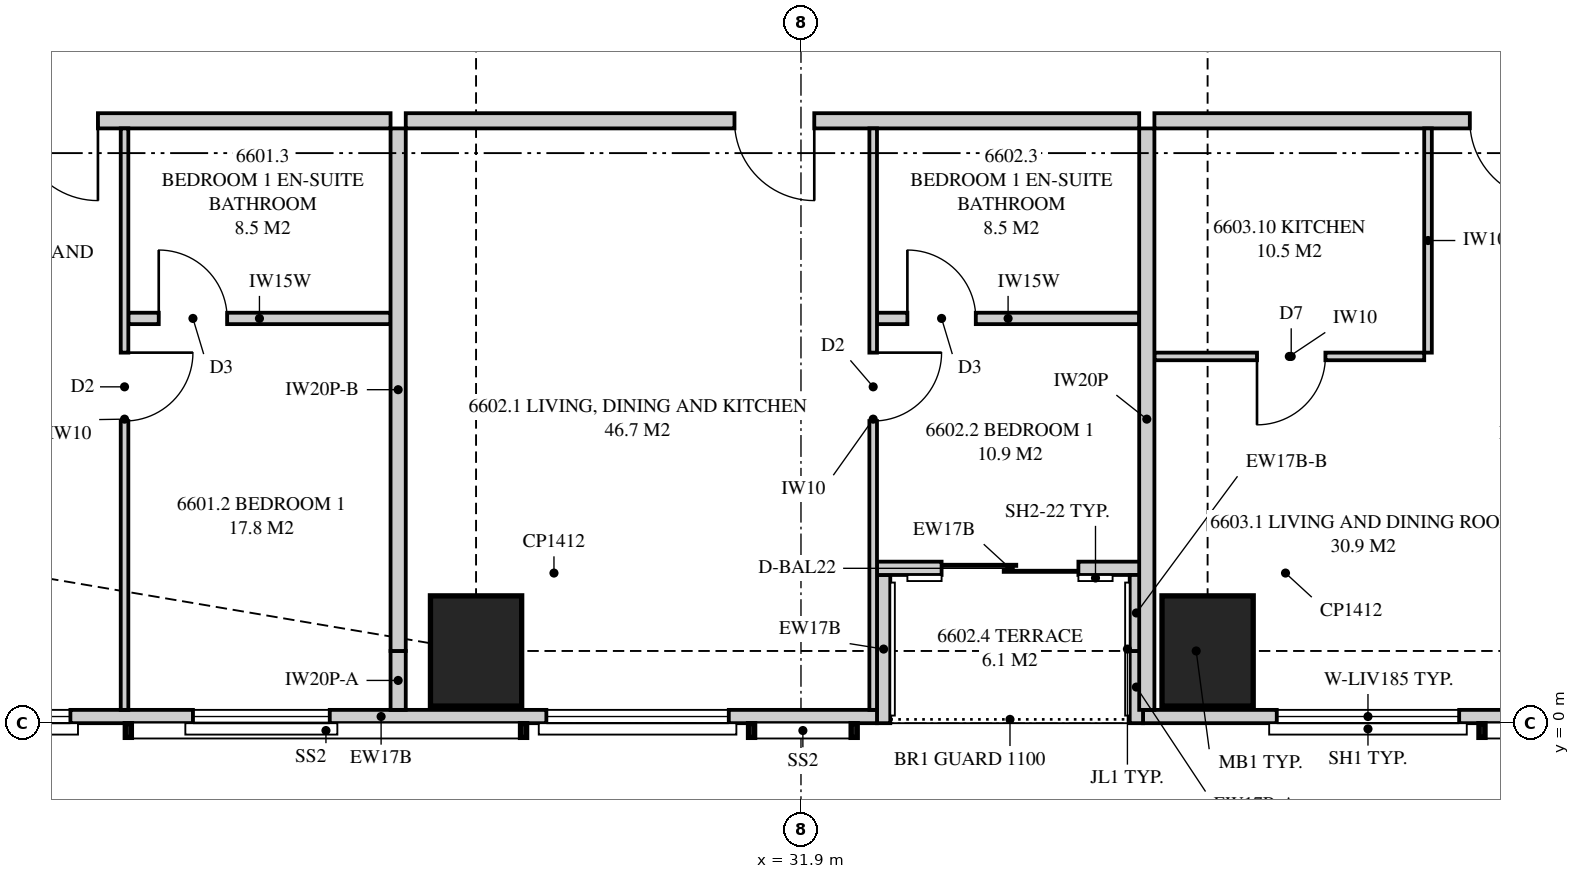
"""IFC4 building model, lengths in metres.
Left out: names, types, materials, properties, quantities, classifications, styles, units other than length and angle.
Written with IfcOpenShell. Run it as: python <this file> out.ifc"""

import sys

from ifc_helpers import new_model, si_unit, direction, frame, frame_2d, origin, origin_2d, place, context, subcontext, project, spatial, polyline, rectangle, outline, extrude, element, fill, save


model = new_model("IFC4")
c1 = context("Model", 3, precision=1e-05, world=origin(), true_north=direction((0.0, 1.0)))
c2 = subcontext(c1, "Body", "Model", "MODEL_VIEW")
j1 = project(units=[si_unit("LENGTHUNIT", "METRE"), si_unit("PLANEANGLEUNIT", "RADIAN")], contexts=[c1])
p1 = place(None, origin())
s1 = spatial("IfcSite", under=j1, at=p1, CompositionType="ELEMENT")
p2 = place(p1, origin())
s2 = spatial("IfcBuilding", under=s1, at=p2, CompositionType="ELEMENT")
p3 = place(p2, frame((0.0, 0.0, 242.45)))
s3 = spatial("IfcBuildingStorey", under=s2, at=p3, CompositionType="ELEMENT", Elevation=242.45)
for number, where, z_axis, x_axis in (
    (1, (27.625, 0.95, 0.0), (0.0, 0.0, 1.0), (0.0, 1.0, 0.0)),
    (2, (37.25, 0.95, 0.0), (0.0, 0.0, 1.0), (0.0, 1.0, 0.0)),
):
    element("IfcColumn", number, at=place(p3, frame(where, z_axis=z_axis, x_axis=x_axis)), inside=s3, PredefinedType="COLUMN", context=c2, shape_type="SweptSolid", body=[
        extrude(rectangle(XDim=1.45, YDim=1.2, at=origin_2d()), origin(), (0.0, 0.0, 1.0), 3.5),
    ])
p4 = place(p3, frame((19.851, 0.087, 0.0), z_axis=(0.0, 0.0, 1.0), x_axis=(1.0, 0.0, 0.0)))
e3 = element("IfcWall", 3, at=p4, inside=s3, PredefinedType="SOLIDWALL", context=c2, shape_type="SweptSolid", body=[
    extrude(outline(polyline([(0.0, 0.0), (13.049, 0.0), (13.049, 2.3), (7.774, 2.3), (7.774, 3.26), (7.642, 3.26), (7.642, 2.3), (7.559, 2.3), (7.559, 3.26), (0.0, 3.26), (0.0, 0.0)])), frame((0.0, 0.087, 0.0), z_axis=(0.0, -1.0, 0.0), x_axis=(1.0, 0.0, 0.0)), (0.0, 0.0, 1.0), 0.175),
])
p5 = place(p4, frame((0.636, 0.0, 0.4)))
e4 = element("IfcOpeningElement", 4, at=p5, cuts=e3, PredefinedType="OPENING", context=c2, shape_type="SweptSolid", body=[
    extrude(rectangle(XDim=1.8, YDim=1.85, at=frame_2d((0.9, 0.925))), frame((0.0, 0.097, 0.0), z_axis=(0.0, -1.0, 0.0), x_axis=(1.0, 0.0, 0.0)), (0.0, 0.0, 1.0), 0.195),
])
p6 = place(p4, frame((4.049, 0.0, 0.4)))
e5 = element("IfcOpeningElement", 5, at=p6, cuts=e3, PredefinedType="OPENING", context=c2, shape_type="SweptSolid", body=[
    extrude(rectangle(XDim=1.8, YDim=1.85, at=frame_2d((0.9, 0.925))), frame((0.0, 0.097, 0.0), z_axis=(0.0, -1.0, 0.0), x_axis=(1.0, 0.0, 0.0)), (0.0, 0.0, 1.0), 0.195),
])
p7 = place(p4, frame((8.699, 0.0, 0.4)))
e6 = element("IfcOpeningElement", 6, at=p7, cuts=e3, PredefinedType="OPENING", context=c2, shape_type="SweptSolid", body=[
    extrude(rectangle(XDim=2.4, YDim=1.85, at=frame_2d((1.2, 0.925))), frame((0.0, 0.097, 0.0), z_axis=(0.0, -1.0, 0.0), x_axis=(1.0, 0.0, 0.0)), (0.0, 0.0, 1.0), 0.195),
])
p8 = place(p3, frame((36.4, 0.087, 0.0), z_axis=(0.0, 0.0, 1.0), x_axis=(1.0, 0.0, 0.0)))
e7 = element("IfcWall", 7, at=p8, inside=s3, PredefinedType="SOLIDWALL", context=c2, shape_type="SweptSolid", body=[
    extrude(outline(polyline([(0.0, 0.0), (17.049, 0.0), (17.049, 3.26), (10.69, 3.26), (10.69, 2.3), (10.606, 2.3), (10.606, 3.26), (10.475, 3.26), (10.475, 2.3), (0.0, 2.3), (0.0, 0.0)])), frame((0.0, 0.087, 0.0), z_axis=(0.0, -1.0, 0.0), x_axis=(1.0, 0.0, 0.0)), (0.0, 0.0, 1.0), 0.175),
])
p9 = place(p8, frame((1.76, 0.0, 0.4)))
e8 = element("IfcOpeningElement", 8, at=p9, cuts=e7, PredefinedType="OPENING", context=c2, shape_type="SweptSolid", body=[
    extrude(rectangle(XDim=2.4, YDim=1.85, at=frame_2d((1.2, 0.925))), frame((0.0, 0.097, 0.0), z_axis=(0.0, -1.0, 0.0), x_axis=(1.0, 0.0, 0.0)), (0.0, 0.0, 1.0), 0.195),
])
p10 = place(p8, frame((6.6, 0.0, 0.4)))
e9 = element("IfcOpeningElement", 9, at=p10, cuts=e7, PredefinedType="OPENING", context=c2, shape_type="SweptSolid", body=[
    extrude(rectangle(XDim=1.8, YDim=1.85, at=frame_2d((0.9, 0.925))), frame((0.0, 0.097, 0.0), z_axis=(0.0, -1.0, 0.0), x_axis=(1.0, 0.0, 0.0)), (0.0, 0.0, 1.0), 0.195),
])
p11 = place(p8, frame((11.357, 0.0, 0.4)))
e10 = element("IfcOpeningElement", 10, at=p11, cuts=e7, PredefinedType="OPENING", context=c2, shape_type="SweptSolid", body=[
    extrude(rectangle(XDim=1.8, YDim=1.85, at=frame_2d((0.9, 0.925))), frame((0.0, 0.097, 0.0), z_axis=(0.0, -1.0, 0.0), x_axis=(1.0, 0.0, 0.0)), (0.0, 0.0, 1.0), 0.195),
])
p12 = place(p8, frame((14.2, 0.0, 0.4)))
e11 = element("IfcOpeningElement", 11, at=p12, cuts=e7, PredefinedType="OPENING", context=c2, shape_type="SweptSolid", body=[
    extrude(rectangle(XDim=1.8, YDim=1.85, at=frame_2d((0.9, 0.925))), frame((0.0, 0.097, 0.0), z_axis=(0.0, -1.0, 0.0), x_axis=(1.0, 0.0, 0.0)), (0.0, 0.0, 1.0), 0.195),
])
p13 = place(p3, frame((32.9, 2.038, 0.0), z_axis=(0.0, 0.0, 1.0), x_axis=(1.0, 0.0, 0.0)))
e12 = element("IfcWall", 12, at=p13, inside=s3, PredefinedType="SOLIDWALL", context=c2, shape_type="SweptSolid", body=[
    extrude(outline(polyline([(0.0, 0.0), (3.5, 0.0), (3.5, 2.66), (3.15, 2.66), (3.15, 3.26), (0.0, 3.26), (0.0, 0.0)])), frame((0.0, 0.087, 0.0), z_axis=(0.0, -1.0, 0.0), x_axis=(1.0, 0.0, 0.0)), (0.0, 0.0, 1.0), 0.175),
])
p14 = place(p13, frame((0.85, 0.0, 0.0)))
e13 = element("IfcOpeningElement", 13, at=p14, cuts=e12, PredefinedType="OPENING", context=c2, shape_type="SweptSolid", body=[
    extrude(rectangle(XDim=1.8, YDim=2.25, at=frame_2d((0.9, 1.125))), frame((0.0, 0.097, 0.0), z_axis=(0.0, -1.0, 0.0), x_axis=(1.0, 0.0, 0.0)), (0.0, 0.0, 1.0), 0.195),
])
p15 = place(p3, frame((32.988, 0.0, 0.0), z_axis=(0.0, 0.0, 1.0), x_axis=(0.0, 1.0, 0.0)))
e14 = element("IfcWall", 14, at=p15, inside=s3, PredefinedType="SOLIDWALL", context=c2, shape_type="SweptSolid", body=[
    extrude(outline(polyline([(0.0, 0.0), (1.95, 0.0), (1.95, 3.26), (1.75, 3.26), (1.75, 2.3), (0.15, 2.3), (0.15, 3.26), (0.0, 3.26), (0.0, 0.0)])), frame((0.0, 0.087, 0.0), z_axis=(0.0, -1.0, 0.0), x_axis=(1.0, 0.0, 0.0)), (0.0, 0.0, 1.0), 0.175),
])
p16 = place(p3, frame((36.312, 0.0, 0.0), z_axis=(0.0, 0.0, 1.0), x_axis=(0.0, 1.0, 0.0)))
e15 = element("IfcWall", 15, at=p16, inside=s3, PredefinedType="SOLIDWALL", context=c2, shape_type="SweptSolid", body=[
    extrude(outline(polyline([(0.0, 0.0), (0.95, 0.0), (0.95, 2.3), (0.15, 2.3), (0.15, 3.26), (0.0, 3.26), (0.0, 0.0)])), frame((0.0, 0.087, 0.0), z_axis=(0.0, -1.0, 0.0), x_axis=(1.0, 0.0, 0.0)), (0.0, 0.0, 1.0), 0.175),
])
p17 = place(p3, frame((36.312, 0.95, 0.0), z_axis=(0.0, 0.0, 1.0), x_axis=(0.0, 1.0, 0.0)))
e16 = element("IfcWall", 16, at=p17, inside=s3, PredefinedType="SOLIDWALL", context=c2, shape_type="SweptSolid", body=[
    extrude(outline(polyline([(0.0, 0.0), (1.0, 0.0), (1.0, 2.66), (0.8, 2.66), (0.8, 2.3), (0.0, 2.3), (0.0, 0.0)])), frame((0.0, 0.087, 0.0), z_axis=(0.0, -1.0, 0.0), x_axis=(1.0, 0.0, 0.0)), (0.0, 0.0, 1.0), 0.175),
])
p18 = place(p3, frame((26.6, 0.175, 0.0), z_axis=(0.0, 0.0, 1.0), x_axis=(0.0, 1.0, 0.0)))
e17 = element("IfcWall", 17, at=p18, inside=s3, PredefinedType="PARTITIONING", context=c2, shape_type="SweptSolid", body=[
    extrude(outline(polyline([(0.0, 0.0), (0.775, 0.0), (0.775, 2.3), (0.026, 2.3), (0.026, 3.26), (0.0, 3.26), (0.0, 0.0)])), frame((0.0, 0.1, 0.0), z_axis=(0.0, -1.0, 0.0), x_axis=(1.0, 0.0, 0.0)), (0.0, 0.0, 1.0), 0.2),
])
p19 = place(p3, frame((26.6, 0.95, 0.0), z_axis=(0.0, 0.0, 1.0), x_axis=(0.0, 1.0, 0.0)))
e18 = element("IfcWall", 18, at=p19, inside=s3, PredefinedType="PARTITIONING", context=c2, shape_type="SweptSolid", body=[
    extrude(outline(polyline([(0.0, 0.0), (6.875, 0.0), (6.875, 2.66), (1.097, 2.66), (1.097, 2.3), (0.0, 2.3), (0.0, 0.0)])), frame((0.0, 0.1, 0.0), z_axis=(0.0, -1.0, 0.0), x_axis=(1.0, 0.0, 0.0)), (0.0, 0.0, 1.0), 0.2),
])
p20 = place(p3, frame((18.0, 7.925, 0.0), z_axis=(0.0, 0.0, 1.0), x_axis=(1.0, 0.0, 0.0)))
e19 = element("IfcWall", 19, at=p20, inside=s3, PredefinedType="PARTITIONING", context=c2, shape_type="SweptSolid", body=[
    extrude(outline(polyline([(0.0, 0.0), (8.5, 0.0), (8.5, 3.26), (8.5, 2.66), (8.315, 2.66), (8.315, 3.26), (1.839, 3.26), (1.839, 2.3), (0.0, 2.3), (0.0, 3.26), (0.0, 0.0)])), frame((0.0, 0.1, 0.0), z_axis=(0.0, -1.0, 0.0), x_axis=(1.0, 0.0, 0.0)), (0.0, 0.0, 1.0), 0.2),
])
p21 = place(p20, frame((3.6, 0.0, 0.0)))
e20 = element("IfcOpeningElement", 20, at=p21, cuts=e19, PredefinedType="OPENING", context=c2, shape_type="SweptSolid", body=[
    extrude(rectangle(XDim=1.05, YDim=2.2, at=frame_2d((0.525, 1.1))), frame((0.0, 0.11, 0.0), z_axis=(0.0, -1.0, 0.0), x_axis=(1.0, 0.0, 0.0)), (0.0, 0.0, 1.0), 0.22),
])
p22 = place(p3, frame((23.0, 0.175, 0.0), z_axis=(0.0, 0.0, 1.0), x_axis=(0.0, 1.0, 0.0)))
e21 = element("IfcWall", 21, at=p22, inside=s3, PredefinedType="PARTITIONING", context=c2, shape_type="SweptSolid", body=[
    extrude(outline(polyline([(0.0, 0.0), (7.65, 0.0), (7.65, 3.26), (2.431, 3.26), (2.431, 2.3), (0.687, 2.3), (0.687, 3.26), (0.0, 3.26), (0.0, 0.0)])), frame((0.0, 0.05, 0.0), z_axis=(0.0, -1.0, 0.0), x_axis=(1.0, 0.0, 0.0)), (0.0, 0.0, 1.0), 0.1),
])
p23 = place(p22, frame((3.8, 0.0, 0.0)))
e22 = element("IfcOpeningElement", 22, at=p23, cuts=e21, PredefinedType="OPENING", context=c2, shape_type="SweptSolid", body=[
    extrude(rectangle(XDim=0.9, YDim=2.1, at=frame_2d((0.45, 1.05))), frame((0.0, 0.06, 0.0), z_axis=(0.0, -1.0, 0.0), x_axis=(1.0, 0.0, 0.0)), (0.0, 0.0, 1.0), 0.12),
])
p24 = place(p3, frame((23.05, 5.325, 0.0), z_axis=(0.0, 0.0, 1.0), x_axis=(1.0, 0.0, 0.0)))
e23 = element("IfcWall", 23, at=p24, inside=s3, PredefinedType="PLUMBINGWALL", context=c2, shape_type="SweptSolid", body=[
    extrude(outline(polyline([(0.0, 0.0), (3.45, 0.0), (3.45, 3.26), (3.45, 2.66), (3.29, 2.66), (3.29, 3.26), (0.0, 3.26), (0.0, 0.0)])), frame((0.0, 0.075, 0.0), z_axis=(0.0, -1.0, 0.0), x_axis=(1.0, 0.0, 0.0)), (0.0, 0.0, 1.0), 0.15),
])
p25 = place(p24, frame((0.4, 0.0, 0.0)))
e24 = element("IfcOpeningElement", 24, at=p25, cuts=e23, PredefinedType="OPENING", context=c2, shape_type="SweptSolid", body=[
    extrude(rectangle(XDim=0.9, YDim=2.1, at=frame_2d((0.45, 1.05))), frame((0.0, 0.085, 0.0), z_axis=(0.0, -1.0, 0.0), x_axis=(1.0, 0.0, 0.0)), (0.0, 0.0, 1.0), 0.17),
])
p26 = place(p3, frame((36.45, 0.175, 0.0), z_axis=(0.0, 0.0, 1.0), x_axis=(0.0, 1.0, 0.0)))
e25 = element("IfcWall", 25, at=p26, inside=s3, PredefinedType="PARTITIONING", context=c2, shape_type="SweptSolid", body=[
    extrude(outline(polyline([(0.0, 0.0), (7.65, 0.0), (7.65, 3.26), (7.65, 2.66), (1.685, 2.66), (1.685, 2.3), (0.0, 2.3), (0.0, 3.26), (0.0, 0.0)])), frame((0.0, 0.1, 0.0), z_axis=(0.0, -1.0, 0.0), x_axis=(1.0, 0.0, 0.0)), (0.0, 0.0, 1.0), 0.2),
])
p27 = place(p3, frame((26.7, 7.925, 0.0), z_axis=(0.0, 0.0, 1.0), x_axis=(1.0, 0.0, 0.0)))
e26 = element("IfcWall", 26, at=p27, inside=s3, PredefinedType="PARTITIONING", context=c2, shape_type="SweptSolid", body=[
    extrude(outline(polyline([(0.0, 0.0), (9.65, 0.0), (9.65, 3.26), (9.65, 2.66), (9.24, 2.66), (9.24, 3.26), (2.235, 3.26), (2.235, 2.66), (0.0, 2.66), (0.0, 3.26), (0.0, 0.0)])), frame((0.0, 0.1, 0.0), z_axis=(0.0, -1.0, 0.0), x_axis=(1.0, 0.0, 0.0)), (0.0, 0.0, 1.0), 0.2),
])
p28 = place(p27, frame((4.325, 0.0, 0.0)))
e27 = element("IfcOpeningElement", 27, at=p28, cuts=e26, PredefinedType="OPENING", context=c2, shape_type="SweptSolid", body=[
    extrude(rectangle(XDim=1.05, YDim=2.2, at=frame_2d((0.525, 1.1))), frame((0.0, 0.11, 0.0), z_axis=(0.0, -1.0, 0.0), x_axis=(1.0, 0.0, 0.0)), (0.0, 0.0, 1.0), 0.22),
])
p29 = place(p3, frame((32.85, 0.175, 0.0), z_axis=(0.0, 0.0, 1.0), x_axis=(0.0, 1.0, 0.0)))
e28 = element("IfcWall", 28, at=p29, inside=s3, PredefinedType="PARTITIONING", context=c2, shape_type="SweptSolid", body=[
    extrude(outline(polyline([(0.0, 0.0), (7.65, 0.0), (7.65, 3.26), (1.635, 3.26), (1.635, 2.3), (0.0, 2.3), (0.0, 3.26), (0.0, 0.0)])), frame((0.0, 0.05, 0.0), z_axis=(0.0, -1.0, 0.0), x_axis=(1.0, 0.0, 0.0)), (0.0, 0.0, 1.0), 0.1),
])
p30 = place(p29, frame((3.8, 0.0, 0.0)))
e29 = element("IfcOpeningElement", 29, at=p30, cuts=e28, PredefinedType="OPENING", context=c2, shape_type="SweptSolid", body=[
    extrude(rectangle(XDim=0.9, YDim=2.1, at=frame_2d((0.45, 1.05))), frame((0.0, 0.06, 0.0), z_axis=(0.0, -1.0, 0.0), x_axis=(1.0, 0.0, 0.0)), (0.0, 0.0, 1.0), 0.12),
])
p31 = place(p3, frame((32.9, 5.325, 0.0), z_axis=(0.0, 0.0, 1.0), x_axis=(1.0, 0.0, 0.0)))
e30 = element("IfcWall", 30, at=p31, inside=s3, PredefinedType="PLUMBINGWALL", context=c2, shape_type="SweptSolid", body=[
    extrude(outline(polyline([(0.0, 0.0), (3.45, 0.0), (3.45, 3.26), (3.45, 2.66), (3.065, 2.66), (3.065, 3.26), (0.0, 3.26), (0.0, 0.0)])), frame((0.0, 0.075, 0.0), z_axis=(0.0, -1.0, 0.0), x_axis=(1.0, 0.0, 0.0)), (0.0, 0.0, 1.0), 0.15),
])
p32 = place(p31, frame((0.4, 0.0, 0.0)))
e31 = element("IfcOpeningElement", 31, at=p32, cuts=e30, PredefinedType="OPENING", context=c2, shape_type="SweptSolid", body=[
    extrude(rectangle(XDim=0.9, YDim=2.1, at=frame_2d((0.45, 1.05))), frame((0.0, 0.085, 0.0), z_axis=(0.0, -1.0, 0.0), x_axis=(1.0, 0.0, 0.0)), (0.0, 0.0, 1.0), 0.17),
])
p33 = place(p3, frame((36.55, 7.925, 0.0), z_axis=(0.0, 0.0, 1.0), x_axis=(1.0, 0.0, 0.0)))
e32 = element("IfcWall", 32, at=p33, inside=s3, PredefinedType="PARTITIONING", context=c2, shape_type="SweptSolid", body=[
    extrude(outline(polyline([(0.0, 0.0), (9.325, 0.0), (9.325, 3.26), (9.325, 2.66), (9.015, 2.66), (9.015, 3.26), (2.01, 3.26), (2.01, 2.66), (0.0, 2.66), (0.0, 3.26), (0.0, 0.0)])), frame((0.0, 0.1, 0.0), z_axis=(0.0, -1.0, 0.0), x_axis=(1.0, 0.0, 0.0)), (0.0, 0.0, 1.0), 0.2),
])
p34 = place(p33, frame((4.15, 0.0, 0.0)))
e33 = element("IfcOpeningElement", 33, at=p34, cuts=e32, PredefinedType="OPENING", context=c2, shape_type="SweptSolid", body=[
    extrude(rectangle(XDim=1.05, YDim=2.2, at=frame_2d((0.525, 1.1))), frame((0.0, 0.11, 0.0), z_axis=(0.0, -1.0, 0.0), x_axis=(1.0, 0.0, 0.0)), (0.0, 0.0, 1.0), 0.22),
])
p35 = place(p3, frame((36.55, 4.825, 0.0), z_axis=(0.0, 0.0, 1.0), x_axis=(1.0, 0.0, 0.0)))
e34 = element("IfcWall", 34, at=p35, inside=s3, PredefinedType="PARTITIONING", context=c2, shape_type="SweptSolid", body=[
    extrude(outline(polyline([(0.0, 0.0), (3.55, 0.0), (3.55, 3.26), (1.96, 3.26), (1.96, 2.66), (0.0, 2.66), (0.0, 3.26), (0.0, 0.0)])), frame((0.0, 0.05, 0.0), z_axis=(0.0, -1.0, 0.0), x_axis=(1.0, 0.0, 0.0)), (0.0, 0.0, 1.0), 0.1),
])
p36 = place(p35, frame((1.35, 0.0, 0.0)))
e35 = element("IfcOpeningElement", 35, at=p36, cuts=e34, PredefinedType="OPENING", context=c2, shape_type="SweptSolid", body=[
    extrude(rectangle(XDim=0.9, YDim=2.1, at=frame_2d((0.45, 1.05))), frame((0.0, 0.06, 0.0), z_axis=(0.0, -1.0, 0.0), x_axis=(1.0, 0.0, 0.0)), (0.0, 0.0, 1.0), 0.12),
])
p37 = place(p3, frame((40.15, 4.875, 0.0), z_axis=(0.0, 0.0, 1.0), x_axis=(0.0, 1.0, 0.0)))
e36 = element("IfcWall", 36, at=p37, inside=s3, PredefinedType="PARTITIONING", context=c2, shape_type="SweptSolid", body=[
    extrude(rectangle(XDim=2.95, YDim=0.1, at=frame_2d((1.475, 0.0))), origin(), (0.0, 0.0, 1.0), 3.26),
])
p38 = place(p5, origin())
e37 = element("IfcWindow", 37, at=p38, inside=s3, PartitioningType="SINGLE_PANEL", PredefinedType="WINDOW", context=c2, shape_type="SweptSolid", body=[
    extrude(rectangle(XDim=1.8, YDim=1.85, at=frame_2d((0.9, 0.925))), frame((0.0, 0.03, 0.0), z_axis=(0.0, -1.0, 0.0), x_axis=(1.0, 0.0, 0.0)), (0.0, 0.0, 1.0), 0.06),
])
fill(e4, e37)
p39 = place(p6, origin())
e38 = element("IfcWindow", 38, at=p39, inside=s3, PartitioningType="SINGLE_PANEL", PredefinedType="WINDOW", context=c2, shape_type="SweptSolid", body=[
    extrude(rectangle(XDim=1.8, YDim=1.85, at=frame_2d((0.9, 0.925))), frame((0.0, 0.03, 0.0), z_axis=(0.0, -1.0, 0.0), x_axis=(1.0, 0.0, 0.0)), (0.0, 0.0, 1.0), 0.06),
])
fill(e5, e38)
p40 = place(p7, origin())
e39 = element("IfcWindow", 39, at=p40, inside=s3, PartitioningType="SINGLE_PANEL", PredefinedType="WINDOW", context=c2, shape_type="SweptSolid", body=[
    extrude(rectangle(XDim=2.4, YDim=1.85, at=frame_2d((1.2, 0.925))), frame((0.0, 0.03, 0.0), z_axis=(0.0, -1.0, 0.0), x_axis=(1.0, 0.0, 0.0)), (0.0, 0.0, 1.0), 0.06),
])
fill(e6, e39)
p41 = place(p14, origin())
e40 = element("IfcDoor", 40, at=p41, inside=s3, OperationType="SLIDING_TO_LEFT", PredefinedType="DOOR", context=c2, shape_type="SweptSolid", body=[
    extrude(rectangle(XDim=1.8, YDim=2.25, at=frame_2d((0.9, 1.125))), frame((0.0, 0.025, 0.0), z_axis=(0.0, -1.0, 0.0), x_axis=(1.0, 0.0, 0.0)), (0.0, 0.0, 1.0), 0.05),
])
fill(e13, e40)
p42 = place(p9, origin())
e41 = element("IfcWindow", 41, at=p42, inside=s3, PartitioningType="SINGLE_PANEL", PredefinedType="WINDOW", context=c2, shape_type="SweptSolid", body=[
    extrude(rectangle(XDim=2.4, YDim=1.85, at=frame_2d((1.2, 0.925))), frame((0.0, 0.03, 0.0), z_axis=(0.0, -1.0, 0.0), x_axis=(1.0, 0.0, 0.0)), (0.0, 0.0, 1.0), 0.06),
])
fill(e8, e41)
p43 = place(p21, frame((1.05, 0.0, 0.0), z_axis=(0.0, 0.0, 1.0), x_axis=(-1.0, 0.0, 0.0)))
e42 = element("IfcDoor", 42, at=p43, inside=s3, OperationType="SINGLE_SWING_LEFT", PredefinedType="DOOR", context=c2, shape_type="SweptSolid", body=[
    extrude(rectangle(XDim=1.05, YDim=2.2, at=frame_2d((0.525, 1.1))), frame((0.0, 0.025, 0.0), z_axis=(0.0, -1.0, 0.0), x_axis=(1.0, 0.0, 0.0)), (0.0, 0.0, 1.0), 0.05),
])
fill(e20, e42)
p44 = place(p23, frame((0.9, 0.0, 0.0), z_axis=(0.0, 0.0, 1.0), x_axis=(-1.0, 0.0, 0.0)))
e43 = element("IfcDoor", 43, at=p44, inside=s3, OperationType="SINGLE_SWING_LEFT", PredefinedType="DOOR", context=c2, shape_type="SweptSolid", body=[
    extrude(rectangle(XDim=0.9, YDim=2.1, at=frame_2d((0.45, 1.05))), frame((0.0, 0.025, 0.0), z_axis=(0.0, -1.0, 0.0), x_axis=(1.0, 0.0, 0.0)), (0.0, 0.0, 1.0), 0.05),
])
fill(e22, e43)
p45 = place(p25, origin())
e44 = element("IfcDoor", 44, at=p45, inside=s3, OperationType="SINGLE_SWING_LEFT", PredefinedType="DOOR", context=c2, shape_type="SweptSolid", body=[
    extrude(rectangle(XDim=0.9, YDim=2.1, at=frame_2d((0.45, 1.05))), frame((0.0, 0.025, 0.0), z_axis=(0.0, -1.0, 0.0), x_axis=(1.0, 0.0, 0.0)), (0.0, 0.0, 1.0), 0.05),
])
fill(e24, e44)
p46 = place(p28, frame((1.05, 0.0, 0.0), z_axis=(0.0, 0.0, 1.0), x_axis=(-1.0, 0.0, 0.0)))
e45 = element("IfcDoor", 45, at=p46, inside=s3, OperationType="SINGLE_SWING_LEFT", PredefinedType="DOOR", context=c2, shape_type="SweptSolid", body=[
    extrude(rectangle(XDim=1.05, YDim=2.2, at=frame_2d((0.525, 1.1))), frame((0.0, 0.025, 0.0), z_axis=(0.0, -1.0, 0.0), x_axis=(1.0, 0.0, 0.0)), (0.0, 0.0, 1.0), 0.05),
])
fill(e27, e45)
p47 = place(p30, frame((0.9, 0.0, 0.0), z_axis=(0.0, 0.0, 1.0), x_axis=(-1.0, 0.0, 0.0)))
e46 = element("IfcDoor", 46, at=p47, inside=s3, OperationType="SINGLE_SWING_LEFT", PredefinedType="DOOR", context=c2, shape_type="SweptSolid", body=[
    extrude(rectangle(XDim=0.9, YDim=2.1, at=frame_2d((0.45, 1.05))), frame((0.0, 0.025, 0.0), z_axis=(0.0, -1.0, 0.0), x_axis=(1.0, 0.0, 0.0)), (0.0, 0.0, 1.0), 0.05),
])
fill(e29, e46)
p48 = place(p32, origin())
e47 = element("IfcDoor", 47, at=p48, inside=s3, OperationType="SINGLE_SWING_LEFT", PredefinedType="DOOR", context=c2, shape_type="SweptSolid", body=[
    extrude(rectangle(XDim=0.9, YDim=2.1, at=frame_2d((0.45, 1.05))), frame((0.0, 0.025, 0.0), z_axis=(0.0, -1.0, 0.0), x_axis=(1.0, 0.0, 0.0)), (0.0, 0.0, 1.0), 0.05),
])
fill(e31, e47)
p49 = place(p34, frame((1.05, 0.0, 0.0), z_axis=(0.0, 0.0, 1.0), x_axis=(-1.0, 0.0, 0.0)))
e48 = element("IfcDoor", 48, at=p49, inside=s3, OperationType="SINGLE_SWING_LEFT", PredefinedType="DOOR", context=c2, shape_type="SweptSolid", body=[
    extrude(rectangle(XDim=1.05, YDim=2.2, at=frame_2d((0.525, 1.1))), frame((0.0, 0.025, 0.0), z_axis=(0.0, -1.0, 0.0), x_axis=(1.0, 0.0, 0.0)), (0.0, 0.0, 1.0), 0.05),
])
fill(e33, e48)
p50 = place(p36, frame((0.9, 0.0, 0.0), z_axis=(0.0, 0.0, 1.0), x_axis=(-1.0, 0.0, 0.0)))
e49 = element("IfcDoor", 49, at=p50, inside=s3, OperationType="SINGLE_SWING_RIGHT", PredefinedType="DOOR", context=c2, shape_type="SweptSolid", body=[
    extrude(rectangle(XDim=0.9, YDim=2.1, at=frame_2d((0.45, 1.05))), frame((0.0, 0.025, 0.0), z_axis=(0.0, -1.0, 0.0), x_axis=(1.0, 0.0, 0.0)), (0.0, 0.0, 1.0), 0.05),
])
fill(e35, e49)
save(model, sys.argv[1])
